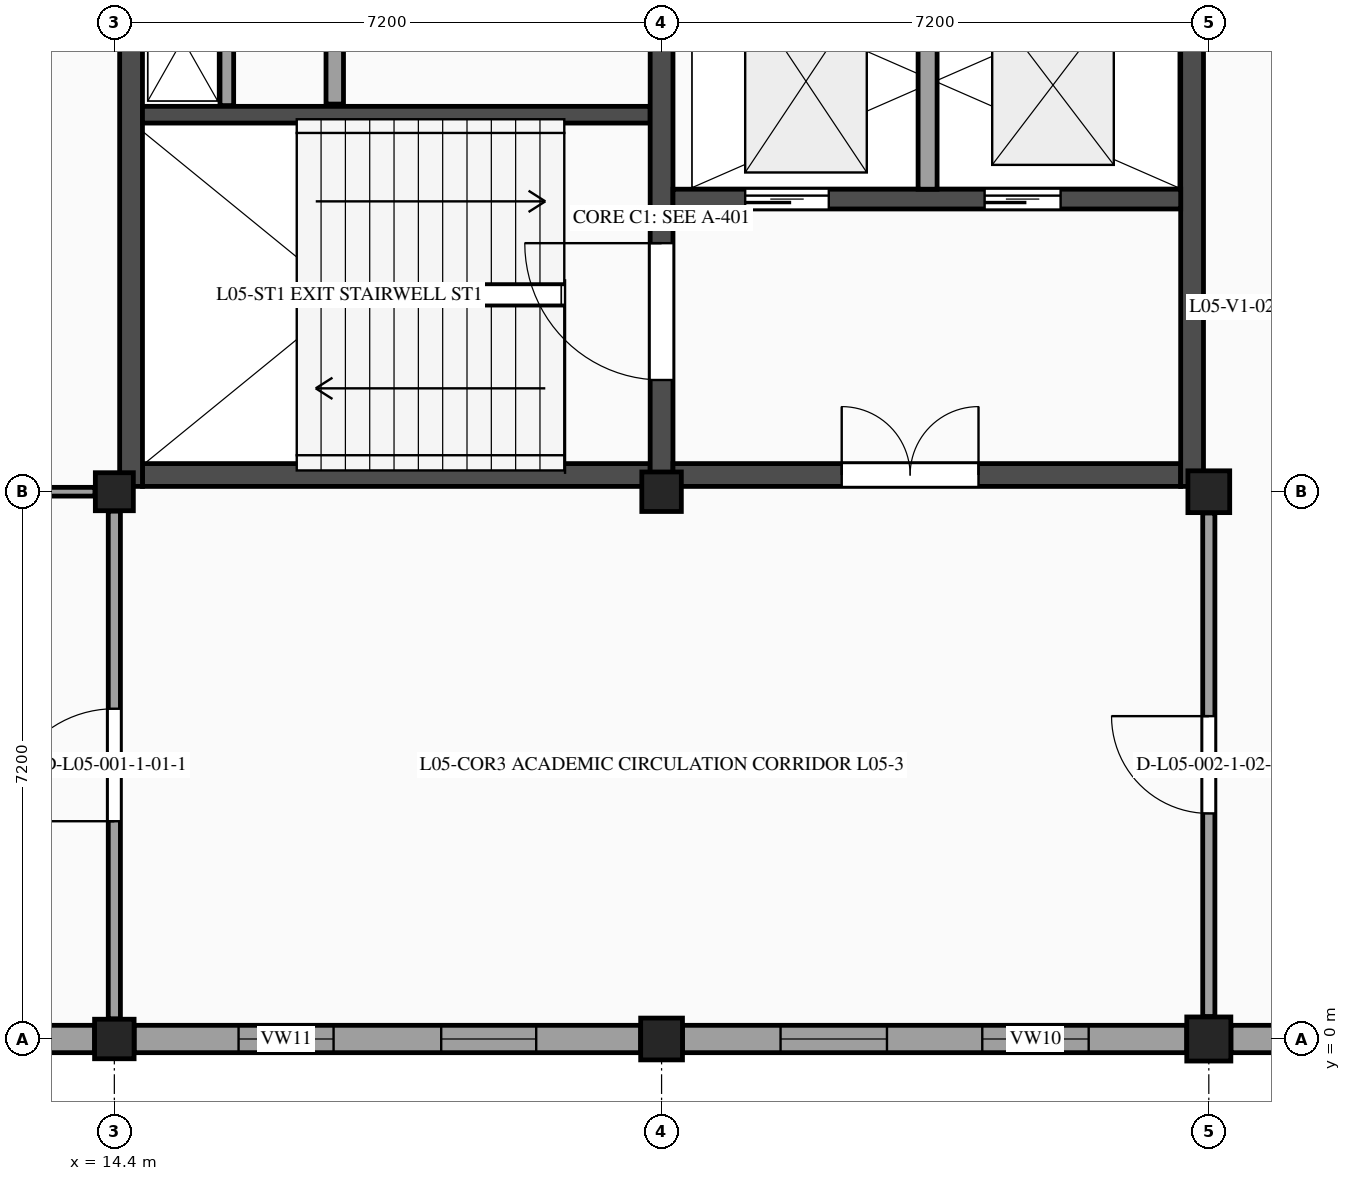
"""IFC4 building model, lengths in metres.
Left out: names, types, materials, properties, quantities, classifications, styles, units other than length and angle.
Written with IfcOpenShell. Run it as: python <this file> out.ifc"""

import sys

from ifc_helpers import new_model, si_unit, direction, frame, frame_2d, origin, origin_2d, place, context, subcontext, project, spatial, rectangle, extrude, element, fill, save


model = new_model("IFC4")
c1 = context("Model", 3, precision=1e-05, world=origin(), true_north=direction((0.0, 1.0)))
c2 = subcontext(c1, "Body", "Model", "MODEL_VIEW")
j1 = project(units=[si_unit("LENGTHUNIT", "METRE"), si_unit("PLANEANGLEUNIT", "RADIAN")], contexts=[c1])
p1 = place(None, origin())
s1 = spatial("IfcSite", under=j1, at=p1, CompositionType="ELEMENT")
p2 = place(p1, origin())
s2 = spatial("IfcBuilding", under=s1, at=p2, CompositionType="ELEMENT")
p3 = place(p2, frame((0.0, 0.0, 22.8)))
s3 = spatial("IfcBuildingStorey", under=s2, at=p3, CompositionType="ELEMENT", Elevation=22.8)
p4 = place(p3, frame((14.4, 0.0, 0.0), z_axis=(0.0, 0.0, 1.0), x_axis=(1.0, 0.0, 0.0)))
e1 = element("IfcColumn", 1, at=p4, inside=s3, PredefinedType="COLUMN", context=c2, shape_type="SweptSolid", body=[
    extrude(rectangle(XDim=0.52, YDim=0.52, at=origin_2d()), origin(), (0.0, 0.0, 1.0), 3.9),
])
p5 = place(p3, frame((14.4, 7.2, 0.0), z_axis=(0.0, 0.0, 1.0), x_axis=(1.0, 0.0, 0.0)))
e2 = element("IfcColumn", 2, at=p5, inside=s3, PredefinedType="COLUMN", context=c2, shape_type="SweptSolid", body=[
    extrude(rectangle(XDim=0.5, YDim=0.5, at=origin_2d()), origin(), (0.0, 0.0, 1.0), 3.9),
])
p6 = place(p3, frame((21.6, 0.0, 0.0), z_axis=(0.0, 0.0, 1.0), x_axis=(1.0, 0.0, 0.0)))
e3 = element("IfcColumn", 3, at=p6, inside=s3, PredefinedType="COLUMN", context=c2, shape_type="SweptSolid", body=[
    extrude(rectangle(XDim=0.55, YDim=0.55, at=origin_2d()), origin(), (0.0, 0.0, 1.0), 3.9),
])
p7 = place(p3, frame((21.6, 7.2, 0.0), z_axis=(0.0, 0.0, 1.0), x_axis=(1.0, 0.0, 0.0)))
e4 = element("IfcColumn", 4, at=p7, inside=s3, PredefinedType="COLUMN", context=c2, shape_type="SweptSolid", body=[
    extrude(rectangle(XDim=0.52, YDim=0.52, at=origin_2d()), origin(), (0.0, 0.0, 1.0), 3.9),
])
p8 = place(p3, frame((28.8, 0.0, 0.0), z_axis=(0.0, 0.0, 1.0), x_axis=(1.0, 0.0, 0.0)))
e5 = element("IfcColumn", 5, at=p8, inside=s3, PredefinedType="COLUMN", context=c2, shape_type="SweptSolid", body=[
    extrude(rectangle(XDim=0.58, YDim=0.58, at=origin_2d()), origin(), (0.0, 0.0, 1.0), 3.9),
])
p9 = place(p3, frame((28.8, 7.2, 0.0), z_axis=(0.0, 0.0, 1.0), x_axis=(1.0, 0.0, 0.0)))
e6 = element("IfcColumn", 6, at=p9, inside=s3, PredefinedType="COLUMN", context=c2, shape_type="SweptSolid", body=[
    extrude(rectangle(XDim=0.55, YDim=0.55, at=origin_2d()), origin(), (0.0, 0.0, 1.0), 3.9),
])
p10 = place(p3, frame((35.75, 0.0, 0.0), z_axis=(0.0, 0.0, 1.0), x_axis=(-1.0, 0.0, 0.0)))
e7 = element("IfcWall", 7, at=p10, inside=s3, PredefinedType="STANDARD", context=c2, shape_type="SweptSolid", body=[
    extrude(rectangle(XDim=6.66, YDim=0.36, at=frame_2d((3.33, 0.0))), origin(), (0.0, 0.0, 1.0), 2.865),
])
p11 = place(p10, frame((1.223, 0.0, 1.15)))
e8 = element("IfcOpeningElement", 8, at=p11, cuts=e7, PredefinedType="OPENING", context=c2, shape_type="SweptSolid", body=[
    extrude(rectangle(XDim=1.55, YDim=1.35, at=frame_2d((0.775, 0.675))), frame((0.0, 0.19, 0.0), z_axis=(0.0, -1.0, 0.0), x_axis=(1.0, 0.0, 0.0)), (0.0, 0.0, 1.0), 0.38),
])
p12 = place(p10, frame((3.887, 0.0, 1.15)))
e9 = element("IfcOpeningElement", 9, at=p12, cuts=e7, PredefinedType="OPENING", context=c2, shape_type="SweptSolid", body=[
    extrude(rectangle(XDim=1.55, YDim=1.35, at=frame_2d((0.775, 0.675))), frame((0.0, 0.19, 0.0), z_axis=(0.0, -1.0, 0.0), x_axis=(1.0, 0.0, 0.0)), (0.0, 0.0, 1.0), 0.38),
])
p13 = place(p3, frame((28.51, 0.0, 0.0), z_axis=(0.0, 0.0, 1.0), x_axis=(-1.0, 0.0, 0.0)))
e10 = element("IfcWall", 10, at=p13, inside=s3, PredefinedType="STANDARD", context=c2, shape_type="SweptSolid", body=[
    extrude(rectangle(XDim=6.635, YDim=0.36, at=frame_2d((3.317, 0.0))), origin(), (0.0, 0.0, 1.0), 2.865),
])
p14 = place(p13, frame((1.291, 0.0, 1.15)))
e11 = element("IfcOpeningElement", 11, at=p14, cuts=e10, PredefinedType="OPENING", context=c2, shape_type="SweptSolid", body=[
    extrude(rectangle(XDim=1.4, YDim=1.3, at=frame_2d((0.7, 0.65))), frame((0.0, 0.19, 0.0), z_axis=(0.0, -1.0, 0.0), x_axis=(1.0, 0.0, 0.0)), (0.0, 0.0, 1.0), 0.38),
])
p15 = place(p13, frame((3.945, 0.0, 1.15)))
e12 = element("IfcOpeningElement", 12, at=p15, cuts=e10, PredefinedType="OPENING", context=c2, shape_type="SweptSolid", body=[
    extrude(rectangle(XDim=1.4, YDim=1.3, at=frame_2d((0.7, 0.65))), frame((0.0, 0.19, 0.0), z_axis=(0.0, -1.0, 0.0), x_axis=(1.0, 0.0, 0.0)), (0.0, 0.0, 1.0), 0.38),
])
p16 = place(p3, frame((21.325, 0.0, 0.0), z_axis=(0.0, 0.0, 1.0), x_axis=(-1.0, 0.0, 0.0)))
e13 = element("IfcWall", 13, at=p16, inside=s3, PredefinedType="STANDARD", context=c2, shape_type="SweptSolid", body=[
    extrude(rectangle(XDim=6.665, YDim=0.36, at=frame_2d((3.333, 0.0))), origin(), (0.0, 0.0, 1.0), 2.865),
])
p17 = place(p16, frame((1.375, 0.0, 1.15)))
e14 = element("IfcOpeningElement", 14, at=p17, cuts=e13, PredefinedType="OPENING", context=c2, shape_type="SweptSolid", body=[
    extrude(rectangle(XDim=1.25, YDim=1.25, at=frame_2d((0.625, 0.625))), frame((0.0, 0.19, 0.0), z_axis=(0.0, -1.0, 0.0), x_axis=(1.0, 0.0, 0.0)), (0.0, 0.0, 1.0), 0.38),
])
p18 = place(p16, frame((4.041, 0.0, 1.15)))
e15 = element("IfcOpeningElement", 15, at=p18, cuts=e13, PredefinedType="OPENING", context=c2, shape_type="SweptSolid", body=[
    extrude(rectangle(XDim=1.25, YDim=1.25, at=frame_2d((0.625, 0.625))), frame((0.0, 0.19, 0.0), z_axis=(0.0, -1.0, 0.0), x_axis=(1.0, 0.0, 0.0)), (0.0, 0.0, 1.0), 0.38),
])
p19 = place(p3, frame((14.14, 0.0, 0.0), z_axis=(0.0, 0.0, 1.0), x_axis=(-1.0, 0.0, 0.0)))
e16 = element("IfcWall", 16, at=p19, inside=s3, PredefinedType="STANDARD", context=c2, shape_type="SweptSolid", body=[
    extrude(rectangle(XDim=6.69, YDim=0.36, at=frame_2d((3.345, 0.0))), origin(), (0.0, 0.0, 1.0), 2.865),
])
p20 = place(p19, frame((1.432, 0.0, 1.15)))
e17 = element("IfcOpeningElement", 17, at=p20, cuts=e16, PredefinedType="OPENING", context=c2, shape_type="SweptSolid", body=[
    extrude(rectangle(XDim=1.15, YDim=1.2, at=frame_2d((0.575, 0.6))), frame((0.0, 0.19, 0.0), z_axis=(0.0, -1.0, 0.0), x_axis=(1.0, 0.0, 0.0)), (0.0, 0.0, 1.0), 0.38),
])
p21 = place(p19, frame((4.108, 0.0, 1.15)))
e18 = element("IfcOpeningElement", 18, at=p21, cuts=e16, PredefinedType="OPENING", context=c2, shape_type="SweptSolid", body=[
    extrude(rectangle(XDim=1.15, YDim=1.2, at=frame_2d((0.575, 0.6))), frame((0.0, 0.19, 0.0), z_axis=(0.0, -1.0, 0.0), x_axis=(1.0, 0.0, 0.0)), (0.0, 0.0, 1.0), 0.38),
])
p22 = place(p3, frame((14.77, 7.42, 0.0), z_axis=(0.0, 0.0, 1.0), x_axis=(1.0, 0.0, 0.0)))
e19 = element("IfcWall", 19, at=p22, inside=s3, PredefinedType="SHEAR", context=c2, shape_type="SweptSolid", body=[
    extrude(rectangle(XDim=6.68, YDim=0.3, at=frame_2d((3.34, 0.0))), origin(), (0.0, 0.0, 1.0), 3.67),
])
p23 = place(p3, frame((14.62, 14.33, 0.0), z_axis=(0.0, 0.0, 1.0), x_axis=(0.0, -1.0, 0.0)))
e20 = element("IfcWall", 20, at=p23, inside=s3, PredefinedType="SHEAR", context=c2, shape_type="SweptSolid", body=[
    extrude(rectangle(XDim=7.06, YDim=0.3, at=frame_2d((3.53, 0.0))), origin(), (0.0, 0.0, 1.0), 3.67),
])
p24 = place(p3, frame((14.77, 12.16, 0.0), z_axis=(0.0, 0.0, 1.0), x_axis=(1.0, 0.0, 0.0)))
e21 = element("IfcWall", 21, at=p24, inside=s3, PredefinedType="SHEAR", context=c2, shape_type="SweptSolid", body=[
    extrude(rectangle(XDim=6.68, YDim=0.22, at=frame_2d((3.34, 0.0))), origin(), (0.0, 0.0, 1.0), 3.67),
])
p25 = place(p3, frame((17.3, 12.3, 0.0), z_axis=(0.0, 0.0, 1.0), x_axis=(0.0, 1.0, 0.0)))
e22 = element("IfcWall", 22, at=p25, inside=s3, PredefinedType="PARTITIONING", context=c2, shape_type="SweptSolid", body=[
    extrude(rectangle(XDim=1.74, YDim=0.23, at=frame_2d((0.87, 0.0))), origin(), (0.0, 0.0, 1.0), 3.67),
])
p26 = place(p3, frame((15.88, 12.28, 0.0), z_axis=(0.0, 0.0, 1.0), x_axis=(0.0, 1.0, 0.0)))
e23 = element("IfcWall", 23, at=p26, inside=s3, PredefinedType="PARTITIONING", context=c2, shape_type="SweptSolid", body=[
    extrude(rectangle(XDim=1.76, YDim=0.18, at=frame_2d((0.88, 0.0))), origin(), (0.0, 0.0, 1.0), 3.67),
])
p27 = place(p3, frame((21.6, 7.27, 0.0), z_axis=(0.0, 0.0, 1.0), x_axis=(0.0, 1.0, 0.0)))
e24 = element("IfcWall", 24, at=p27, inside=s3, PredefinedType="SHEAR", context=c2, shape_type="SweptSolid", body=[
    extrude(rectangle(XDim=7.06, YDim=0.3, at=frame_2d((3.53, 0.0))), origin(), (0.0, 0.0, 1.0), 3.67),
])
p28 = place(p27, frame((1.4, 0.0, 0.0)))
e25 = element("IfcOpeningElement", 25, at=p28, cuts=e24, PredefinedType="OPENING", context=c2, shape_type="SweptSolid", body=[
    extrude(rectangle(XDim=1.8, YDim=2.2, at=frame_2d((0.9, 1.1))), frame((0.0, 0.16, 0.0), z_axis=(0.0, -1.0, 0.0), x_axis=(1.0, 0.0, 0.0)), (0.0, 0.0, 1.0), 0.32),
])
p29 = place(p3, frame((21.75, 7.42, 0.0), z_axis=(0.0, 0.0, 1.0), x_axis=(1.0, 0.0, 0.0)))
e26 = element("IfcWall", 26, at=p29, inside=s3, PredefinedType="SHEAR", context=c2, shape_type="SweptSolid", body=[
    extrude(rectangle(XDim=6.68, YDim=0.3, at=frame_2d((3.34, 0.0))), origin(), (0.0, 0.0, 1.0), 3.67),
])
p30 = place(p29, frame((2.22, 0.0, 0.0)))
e27 = element("IfcOpeningElement", 27, at=p30, cuts=e26, PredefinedType="OPENING", context=c2, shape_type="SweptSolid", body=[
    extrude(rectangle(XDim=1.8, YDim=2.2, at=frame_2d((0.9, 1.1))), frame((0.0, 0.16, 0.0), z_axis=(0.0, -1.0, 0.0), x_axis=(1.0, 0.0, 0.0)), (0.0, 0.0, 1.0), 0.32),
])
p31 = place(p3, frame((28.58, 7.27, 0.0), z_axis=(0.0, 0.0, 1.0), x_axis=(0.0, 1.0, 0.0)))
e28 = element("IfcWall", 28, at=p31, inside=s3, PredefinedType="SHEAR", context=c2, shape_type="SweptSolid", body=[
    extrude(rectangle(XDim=7.06, YDim=0.3, at=frame_2d((3.53, 0.0))), origin(), (0.0, 0.0, 1.0), 3.67),
])
p32 = place(p3, frame((21.75, 11.05, 0.0), z_axis=(0.0, 0.0, 1.0), x_axis=(1.0, 0.0, 0.0)))
e29 = element("IfcWall", 29, at=p32, inside=s3, PredefinedType="SHEAR", context=c2, shape_type="SweptSolid", body=[
    extrude(rectangle(XDim=6.68, YDim=0.26, at=frame_2d((3.34, 0.0))), origin(), (0.0, 0.0, 1.0), 3.67),
])
p33 = place(p32, frame((0.95, 0.0, 0.0)))
e30 = element("IfcOpeningElement", 30, at=p33, cuts=e29, PredefinedType="OPENING", context=c2, shape_type="SweptSolid", body=[
    extrude(rectangle(XDim=1.1, YDim=2.2, at=frame_2d((0.55, 1.1))), frame((0.0, 0.14, 0.0), z_axis=(0.0, -1.0, 0.0), x_axis=(1.0, 0.0, 0.0)), (0.0, 0.0, 1.0), 0.28),
])
p34 = place(p32, frame((4.1, 0.0, 0.0)))
e31 = element("IfcOpeningElement", 31, at=p34, cuts=e29, PredefinedType="OPENING", context=c2, shape_type="SweptSolid", body=[
    extrude(rectangle(XDim=1.0, YDim=2.15, at=frame_2d((0.5, 1.075))), frame((0.0, 0.14, 0.0), z_axis=(0.0, -1.0, 0.0), x_axis=(1.0, 0.0, 0.0)), (0.0, 0.0, 1.0), 0.28),
])
p35 = place(p3, frame((25.1, 11.18, 0.0), z_axis=(0.0, 0.0, 1.0), x_axis=(0.0, 1.0, 0.0)))
e32 = element("IfcWall", 32, at=p35, inside=s3, PredefinedType="PARTITIONING", context=c2, shape_type="SweptSolid", body=[
    extrude(rectangle(XDim=2.87, YDim=0.25, at=frame_2d((1.435, 0.0))), origin(), (0.0, 0.0, 1.0), 3.67),
])
p36 = place(p3, frame((14.4, 0.265, 0.0), z_axis=(0.0, 0.0, 1.0), x_axis=(0.0, 1.0, 0.0)))
e33 = element("IfcWall", 33, at=p36, inside=s3, PredefinedType="PARTITIONING", context=c2, shape_type="SweptSolid", body=[
    extrude(rectangle(XDim=6.68, YDim=0.16, at=frame_2d((3.34, 0.0))), origin(), (0.0, 0.0, 1.0), 2.975),
])
p37 = place(p36, frame((2.6, 0.0, 0.0)))
e34 = element("IfcOpeningElement", 34, at=p37, cuts=e33, PredefinedType="OPENING", context=c2, shape_type="SweptSolid", body=[
    extrude(rectangle(XDim=1.48, YDim=2.28, at=frame_2d((0.74, 1.14))), frame((0.0, 0.09, 0.0), z_axis=(0.0, -1.0, 0.0), x_axis=(1.0, 0.0, 0.0)), (0.0, 0.0, 1.0), 0.18),
])
p38 = place(p3, frame((7.495, 7.2, 0.0), z_axis=(0.0, 0.0, 1.0), x_axis=(1.0, 0.0, 0.0)))
e35 = element("IfcWall", 35, at=p38, inside=s3, PredefinedType="PARTITIONING", context=c2, shape_type="SweptSolid", body=[
    extrude(rectangle(XDim=6.65, YDim=0.115, at=frame_2d((3.325, 0.0))), origin(), (0.0, 0.0, 1.0), 3.01),
])
p39 = place(p3, frame((28.8, 0.295, 0.0), z_axis=(0.0, 0.0, 1.0), x_axis=(0.0, 1.0, 0.0)))
e36 = element("IfcWall", 36, at=p39, inside=s3, PredefinedType="PARTITIONING", context=c2, shape_type="SweptSolid", body=[
    extrude(rectangle(XDim=6.625, YDim=0.16, at=frame_2d((3.312, 0.0))), origin(), (0.0, 0.0, 1.0), 2.975),
])
p40 = place(p39, frame((2.673, 0.0, 0.0)))
e37 = element("IfcOpeningElement", 37, at=p40, cuts=e36, PredefinedType="OPENING", context=c2, shape_type="SweptSolid", body=[
    extrude(rectangle(XDim=1.28, YDim=2.24, at=frame_2d((0.64, 1.12))), frame((0.0, 0.09, 0.0), z_axis=(0.0, -1.0, 0.0), x_axis=(1.0, 0.0, 0.0)), (0.0, 0.0, 1.0), 0.18),
])
p41 = place(p14, origin())
e38 = element("IfcWindow", 38, at=p41, inside=s3, PartitioningType="SINGLE_PANEL", PredefinedType="WINDOW", context=c2, shape_type="SweptSolid", body=[
    extrude(rectangle(XDim=1.4, YDim=1.3, at=frame_2d((0.7, 0.65))), frame((0.0, -0.08, 0.0), z_axis=(0.0, -1.0, 0.0), x_axis=(1.0, 0.0, 0.0)), (0.0, 0.0, 1.0), 0.06),
])
fill(e11, e38)
p42 = place(p15, origin())
e39 = element("IfcWindow", 39, at=p42, inside=s3, PartitioningType="SINGLE_PANEL", PredefinedType="WINDOW", context=c2, shape_type="SweptSolid", body=[
    extrude(rectangle(XDim=1.4, YDim=1.3, at=frame_2d((0.7, 0.65))), frame((0.0, -0.08, 0.0), z_axis=(0.0, -1.0, 0.0), x_axis=(1.0, 0.0, 0.0)), (0.0, 0.0, 1.0), 0.06),
])
fill(e12, e39)
p43 = place(p17, origin())
e40 = element("IfcWindow", 40, at=p43, inside=s3, PartitioningType="SINGLE_PANEL", PredefinedType="WINDOW", context=c2, shape_type="SweptSolid", body=[
    extrude(rectangle(XDim=1.25, YDim=1.25, at=frame_2d((0.625, 0.625))), frame((0.0, -0.08, 0.0), z_axis=(0.0, -1.0, 0.0), x_axis=(1.0, 0.0, 0.0)), (0.0, 0.0, 1.0), 0.06),
])
fill(e14, e40)
p44 = place(p18, origin())
e41 = element("IfcWindow", 41, at=p44, inside=s3, PartitioningType="SINGLE_PANEL", PredefinedType="WINDOW", context=c2, shape_type="SweptSolid", body=[
    extrude(rectangle(XDim=1.25, YDim=1.25, at=frame_2d((0.625, 0.625))), frame((0.0, -0.08, 0.0), z_axis=(0.0, -1.0, 0.0), x_axis=(1.0, 0.0, 0.0)), (0.0, 0.0, 1.0), 0.06),
])
fill(e15, e41)
p45 = place(p28, origin())
e42 = element("IfcDoor", 42, at=p45, inside=s3, OperationType="SINGLE_SWING_RIGHT", PredefinedType="DOOR", context=c2, shape_type="SweptSolid", body=[
    extrude(rectangle(XDim=1.8, YDim=2.2, at=frame_2d((0.9, 1.1))), frame((0.0, 0.025, 0.0), z_axis=(0.0, -1.0, 0.0), x_axis=(1.0, 0.0, 0.0)), (0.0, 0.0, 1.0), 0.05),
])
fill(e25, e42)
p46 = place(p33, origin())
e43 = element("IfcDoor", 43, at=p46, inside=s3, OperationType="SLIDING_TO_LEFT", PredefinedType="DOOR", context=c2, shape_type="SweptSolid", body=[
    extrude(rectangle(XDim=1.1, YDim=2.2, at=frame_2d((0.55, 1.1))), frame((0.0, 0.025, 0.0), z_axis=(0.0, -1.0, 0.0), x_axis=(1.0, 0.0, 0.0)), (0.0, 0.0, 1.0), 0.05),
])
fill(e30, e43)
p47 = place(p34, origin())
e44 = element("IfcDoor", 44, at=p47, inside=s3, OperationType="SLIDING_TO_RIGHT", PredefinedType="DOOR", context=c2, shape_type="SweptSolid", body=[
    extrude(rectangle(XDim=1.0, YDim=2.15, at=frame_2d((0.5, 1.075))), frame((0.0, 0.025, 0.0), z_axis=(0.0, -1.0, 0.0), x_axis=(1.0, 0.0, 0.0)), (0.0, 0.0, 1.0), 0.05),
])
fill(e31, e44)
p48 = place(p30, origin())
e45 = element("IfcDoor", 45, at=p48, inside=s3, OperationType="DOUBLE_DOOR_SINGLE_SWING", PredefinedType="DOOR", context=c2, shape_type="SweptSolid", body=[
    extrude(rectangle(XDim=1.8, YDim=2.2, at=frame_2d((0.9, 1.1))), frame((0.0, 0.025, 0.0), z_axis=(0.0, -1.0, 0.0), x_axis=(1.0, 0.0, 0.0)), (0.0, 0.0, 1.0), 0.05),
])
fill(e27, e45)
p49 = place(p37, origin())
e46 = element("IfcDoor", 46, at=p49, inside=s3, OperationType="SINGLE_SWING_LEFT", PredefinedType="DOOR", context=c2, shape_type="SweptSolid", body=[
    extrude(rectangle(XDim=1.48, YDim=2.28, at=frame_2d((0.74, 1.14))), frame((0.0, 0.025, 0.0), z_axis=(0.0, -1.0, 0.0), x_axis=(1.0, 0.0, 0.0)), (0.0, 0.0, 1.0), 0.05),
])
fill(e34, e46)
p50 = place(p40, origin())
e47 = element("IfcDoor", 47, at=p50, inside=s3, OperationType="SINGLE_SWING_RIGHT", PredefinedType="DOOR", context=c2, shape_type="SweptSolid", body=[
    extrude(rectangle(XDim=1.28, YDim=2.24, at=frame_2d((0.64, 1.12))), frame((0.0, 0.025, 0.0), z_axis=(0.0, -1.0, 0.0), x_axis=(1.0, 0.0, 0.0)), (0.0, 0.0, 1.0), 0.05),
])
fill(e37, e47)
save(model, sys.argv[1])
